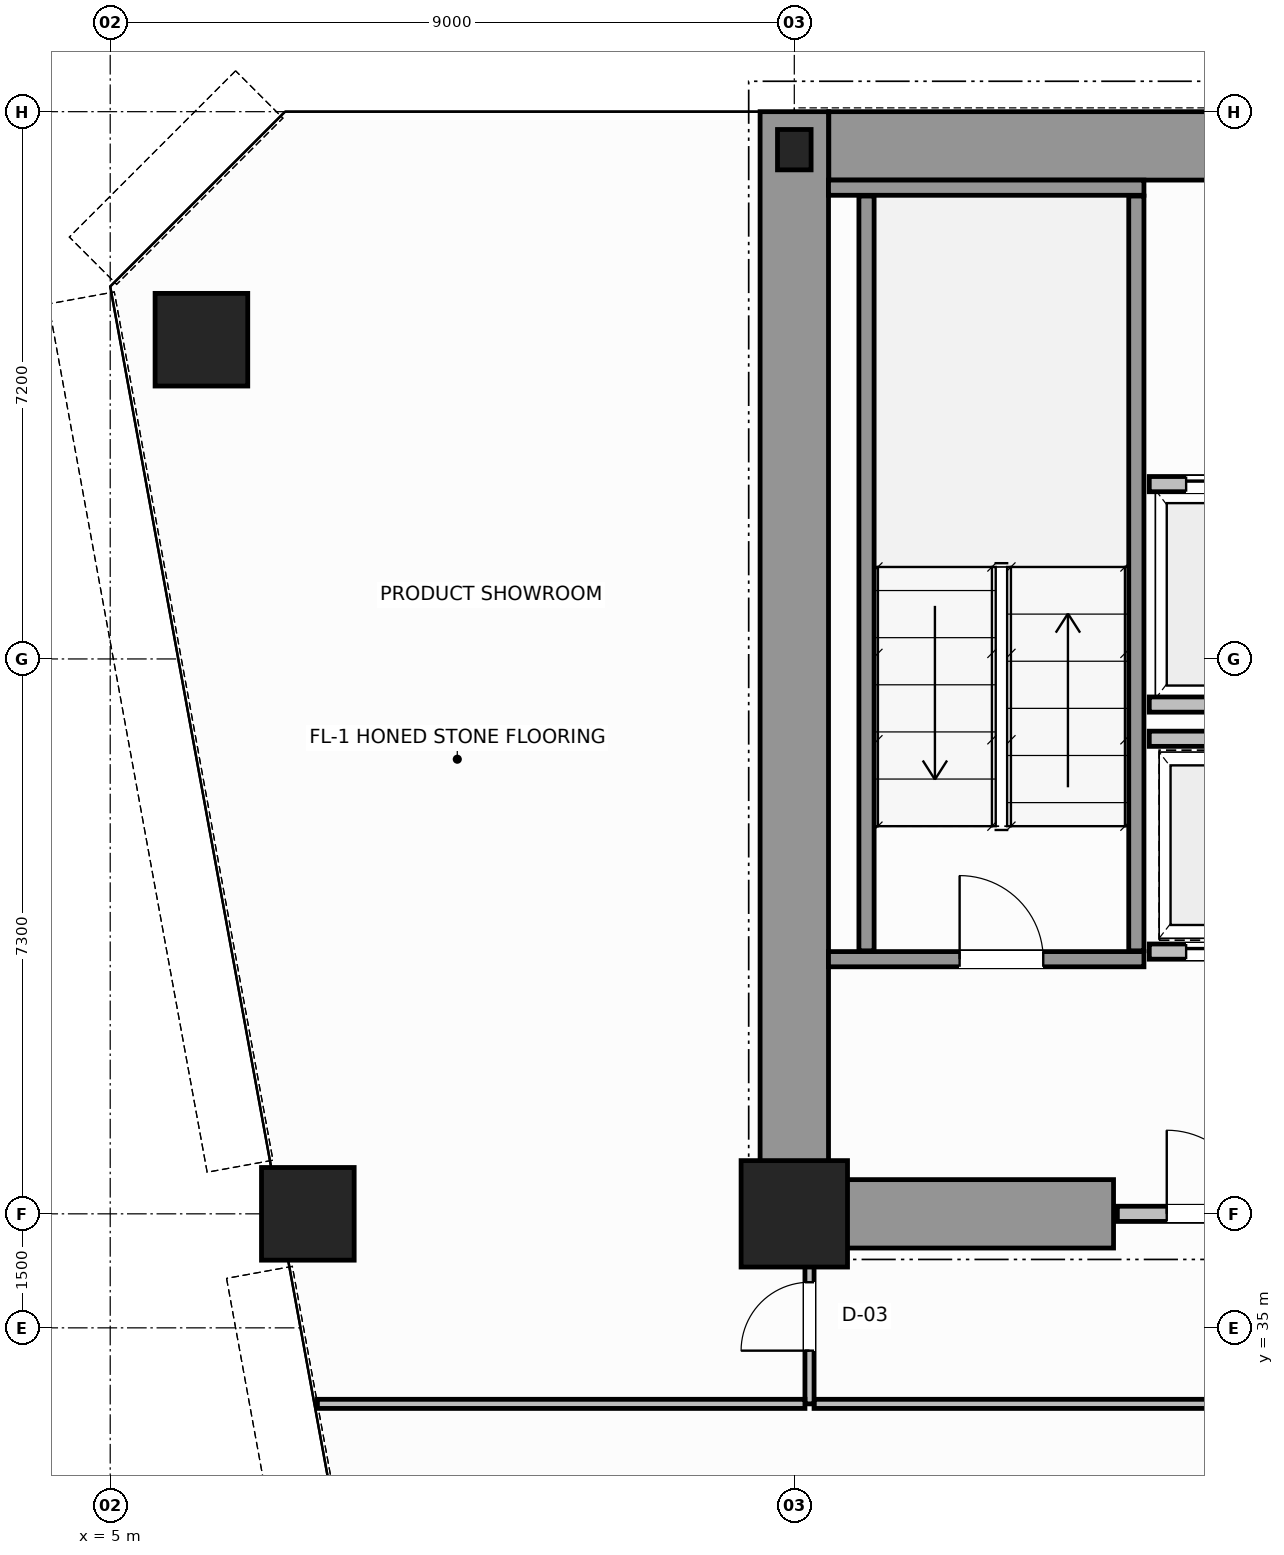
"""IFC4 building model, lengths in metres.
Left out: names, types, materials, properties, quantities, classifications, styles, units other than length and angle.
Written with IfcOpenShell. Run it as: python <this file> out.ifc"""

import sys

from ifc_helpers import new_model, si_unit, direction, frame, frame_2d, origin, origin_2d, place, context, subcontext, project, spatial, rectangle, hollow_circle, i_section, extrude, source, transform, mapped, element, fill, save


model = new_model("IFC4")
c1 = context("Model", 3, precision=1e-05, world=origin(), true_north=direction((0.0, 1.0)))
c2 = subcontext(c1, "Body", "Model", "MODEL_VIEW")
j1 = project(units=[si_unit("LENGTHUNIT", "METRE"), si_unit("PLANEANGLEUNIT", "RADIAN")], contexts=[c1])
p1 = place(None, origin())
s1 = spatial("IfcSite", under=j1, at=p1, CompositionType="ELEMENT")
p2 = place(p1, origin())
s2 = spatial("IfcBuilding", under=s1, at=p2, CompositionType="ELEMENT")
p3 = place(p2, frame((0.0, 0.0, 75.8)))
s3 = spatial("IfcBuildingStorey", under=s2, at=p3, CompositionType="ELEMENT", Elevation=75.8)
m1 = source(origin(), c2, "Body", "SweptSolid", [
    extrude(rectangle(XDim=1.4, YDim=1.4, at=origin_2d()), origin(), (0.0, 0.0, 1.0), 3.8),
])
p4 = place(p3, frame((14.0, 36.5, 0.0), z_axis=(0.0, 0.0, 1.0), x_axis=(1.0, 0.0, 0.0)))
e1 = element("IfcColumn", 1, at=p4, inside=s3, PredefinedType="COLUMN", context=c2, shape_type="MappedRepresentation", body=[
    mapped(m1, transform((0.0, 0.0, 0.0), scale=1.0)),
])
m2 = source(origin(), c2, "Body", "SweptSolid", [
    extrude(i_section(OverallWidth=0.442, OverallDepth=0.531, WebThickness=0.065, FlangeThickness=0.076, FilletRadius=0.015, at=origin_2d()), origin(), (0.0, 0.0, 1.0), 3.8),
])
p5 = place(p3, frame((14.0, 50.5, 0.0), z_axis=(0.0, 0.0, 1.0), x_axis=(1.0, 0.0, 0.0)))
e2 = element("IfcColumn", 2, at=p5, inside=s3, PredefinedType="COLUMN", context=c2, shape_type="MappedRepresentation", body=[
    mapped(m2, transform((0.0, 0.0, 0.0), scale=1.0)),
])
m3 = source(origin(), c2, "Body", "SweptSolid", [
    extrude(hollow_circle(Radius=0.61, WallThickness=0.05, at=origin_2d()), origin(), (0.0, 0.0, 1.0), 3.8),
])
for number, where, z_axis, x_axis in (
    (3, (6.2, 48.0, 0.0), (0.0, 0.0, 1.0), (1.0, 0.0, 0.0)),
    (4, (7.6, 36.5, 0.0), (0.0, 0.0, 1.0), (1.0, 0.0, 0.0)),
):
    element("IfcColumn", number, at=place(p3, frame(where, z_axis=z_axis, x_axis=x_axis)), inside=s3, PredefinedType="COLUMN", context=c2, shape_type="MappedRepresentation", body=[
        mapped(m3, transform((0.0, 0.0, 0.0), scale=1.0)),
    ])
p6 = place(p3, frame((14.454, 50.55, 0.0), z_axis=(0.0, 0.0, 1.0), x_axis=(1.0, 0.0, 0.0)))
e5 = element("IfcWall", 5, at=p6, inside=s3, PredefinedType="SHEAR", context=c2, shape_type="SweptSolid", body=[
    extrude(rectangle(XDim=19.544, YDim=0.9, at=frame_2d((9.772, 0.0))), origin(), (0.0, 0.0, 1.0), 3.8),
])
p7 = place(p3, frame((14.0, 36.5, 0.0), z_axis=(0.0, 0.0, 1.0), x_axis=(0.0, 1.0, 0.0)))
e6 = element("IfcWall", 6, at=p7, inside=s3, PredefinedType="SHEAR", context=c2, shape_type="SweptSolid", body=[
    extrude(rectangle(XDim=14.5, YDim=0.9, at=frame_2d((7.25, 0.0))), origin(), (0.0, 0.0, 1.0), 3.8),
])
p8 = place(p3, frame((14.47, 36.5, 0.0), z_axis=(0.0, 0.0, 1.0), x_axis=(1.0, 0.0, 0.0)))
e7 = element("IfcWall", 7, at=p8, inside=s3, PredefinedType="SHEAR", context=c2, shape_type="SweptSolid", body=[
    extrude(rectangle(XDim=3.73, YDim=0.9, at=frame_2d((1.865, 0.0))), origin(), (0.0, 0.0, 1.0), 2.38),
])
p9 = place(p3, frame((14.45, 39.85, 0.0), z_axis=(0.0, 0.0, 1.0), x_axis=(1.0, 0.0, 0.0)))
e8 = element("IfcWall", 8, at=p9, inside=s3, PredefinedType="SOLIDWALL", context=c2, shape_type="SweptSolid", body=[
    extrude(rectangle(XDim=4.15, YDim=0.2, at=frame_2d((2.075, 0.0))), origin(), (0.0, 0.0, 1.0), 3.8),
])
p10 = place(p9, frame((1.725, 0.0, 0.0)))
e9 = element("IfcOpeningElement", 9, at=p10, cuts=e8, PredefinedType="OPENING", context=c2, shape_type="SweptSolid", body=[
    extrude(rectangle(XDim=1.1, YDim=2.15, at=frame_2d((0.55, 1.075))), frame((0.0, 0.11, 0.0), z_axis=(0.0, -1.0, 0.0), x_axis=(1.0, 0.0, 0.0)), (0.0, 0.0, 1.0), 0.22),
])
p11 = place(p3, frame((14.45, 50.0, 0.0), z_axis=(0.0, 0.0, 1.0), x_axis=(1.0, 0.0, 0.0)))
e10 = element("IfcWall", 10, at=p11, inside=s3, PredefinedType="SOLIDWALL", context=c2, shape_type="SweptSolid", body=[
    extrude(rectangle(XDim=4.15, YDim=0.2, at=frame_2d((2.075, 0.0))), origin(), (0.0, 0.0, 1.0), 3.8),
])
for number, where, z_axis, x_axis in (
    (11, (14.95, 39.96, 0.0), (0.0, 0.0, 1.0), (0.0, 1.0, 0.0)),
    (12, (18.5, 39.96, 0.0), (0.0, 0.0, 1.0), (0.0, 1.0, 0.0)),
):
    element("IfcWall", number, at=place(p3, frame(where, z_axis=z_axis, x_axis=x_axis)), inside=s3, PredefinedType="SOLIDWALL", context=c2, shape_type="SweptSolid", body=[
        extrude(rectangle(XDim=9.93, YDim=0.2, at=frame_2d((4.965, 0.0))), origin(), (0.0, 0.0, 1.0), 3.8),
    ])
p12 = place(p3, frame((18.25, 36.5, 0.0), z_axis=(0.0, 0.0, 1.0), x_axis=(1.0, 0.0, 0.0)))
e13 = element("IfcWall", 13, at=p12, inside=s3, PredefinedType="SOLIDWALL", context=c2, shape_type="SweptSolid", body=[
    extrude(rectangle(XDim=2.47, YDim=0.2, at=frame_2d((1.235, 0.0))), origin(), (0.0, 0.0, 1.0), 2.37),
])
p13 = place(p12, frame((0.65, 0.0, 0.0)))
e14 = element("IfcOpeningElement", 14, at=p13, cuts=e13, PredefinedType="OPENING", context=c2, shape_type="SweptSolid", body=[
    extrude(rectangle(XDim=1.1, YDim=2.15, at=frame_2d((0.55, 1.075))), frame((0.0, 0.11, 0.0), z_axis=(0.0, -1.0, 0.0), x_axis=(1.0, 0.0, 0.0)), (0.0, 0.0, 1.0), 0.22),
])
p14 = place(p3, frame((18.67, 46.1, 0.0), z_axis=(0.0, 0.0, 1.0), x_axis=(1.0, 0.0, 0.0)))
e15 = element("IfcWall", 15, at=p14, inside=s3, PredefinedType="SOLIDWALL", context=c2, shape_type="SweptSolid", body=[
    extrude(rectangle(XDim=2.07, YDim=0.2, at=frame_2d((1.035, 0.0))), origin(), (0.0, 0.0, 1.0), 3.58),
])
p15 = place(p14, frame((0.485, 0.0, 0.0)))
e16 = element("IfcOpeningElement", 16, at=p15, cuts=e15, PredefinedType="OPENING", context=c2, shape_type="SweptSolid", body=[
    extrude(rectangle(XDim=1.1, YDim=2.15, at=frame_2d((0.55, 1.075))), frame((0.0, 0.11, 0.0), z_axis=(0.0, -1.0, 0.0), x_axis=(1.0, 0.0, 0.0)), (0.0, 0.0, 1.0), 0.22),
])
p16 = place(p3, frame((18.67, 43.2, 0.0), z_axis=(0.0, 0.0, 1.0), x_axis=(1.0, 0.0, 0.0)))
e17 = element("IfcWall", 17, at=p16, inside=s3, PredefinedType="SOLIDWALL", context=c2, shape_type="SweptSolid", body=[
    extrude(rectangle(XDim=2.07, YDim=0.2, at=frame_2d((1.035, 0.0))), origin(), (0.0, 0.0, 1.0), 3.58),
])
p17 = place(p3, frame((18.67, 39.95, 0.0), z_axis=(0.0, 0.0, 1.0), x_axis=(1.0, 0.0, 0.0)))
e18 = element("IfcWall", 18, at=p17, inside=s3, PredefinedType="SOLIDWALL", context=c2, shape_type="SweptSolid", body=[
    extrude(rectangle(XDim=2.07, YDim=0.2, at=frame_2d((1.035, 0.0))), origin(), (0.0, 0.0, 1.0), 3.58),
])
p18 = place(p17, frame((0.485, 0.0, 0.0)))
e19 = element("IfcOpeningElement", 19, at=p18, cuts=e18, PredefinedType="OPENING", context=c2, shape_type="SweptSolid", body=[
    extrude(rectangle(XDim=1.1, YDim=2.15, at=frame_2d((0.55, 1.075))), frame((0.0, 0.11, 0.0), z_axis=(0.0, -1.0, 0.0), x_axis=(1.0, 0.0, 0.0)), (0.0, 0.0, 1.0), 0.22),
])
p19 = place(p3, frame((18.67, 42.75, 0.0), z_axis=(0.0, 0.0, 1.0), x_axis=(1.0, 0.0, 0.0)))
e20 = element("IfcWall", 20, at=p19, inside=s3, PredefinedType="SOLIDWALL", context=c2, shape_type="SweptSolid", body=[
    extrude(rectangle(XDim=2.07, YDim=0.2, at=frame_2d((1.035, 0.0))), origin(), (0.0, 0.0, 1.0), 3.58),
])
p20 = place(p3, frame((14.26, 34.0, 0.0), z_axis=(0.0, 0.0, 1.0), x_axis=(1.0, 0.0, 0.0)))
e21 = element("IfcWall", 21, at=p20, inside=s3, PredefinedType="PARTITIONING", context=c2, shape_type="SweptSolid", body=[
    extrude(rectangle(XDim=15.88, YDim=0.12, at=frame_2d((7.94, 0.0))), origin(), (0.0, 0.0, 1.0), 3.58),
])
p21 = place(p3, frame((14.2, 34.0, 0.0), z_axis=(0.0, 0.0, 1.0), x_axis=(0.0, 1.0, 0.0)))
e22 = element("IfcWall", 22, at=p21, inside=s3, PredefinedType="PARTITIONING", context=c2, shape_type="SweptSolid", body=[
    extrude(rectangle(XDim=2.44, YDim=0.12, at=frame_2d((1.22, 0.0))), origin(), (0.0, 0.0, 1.0), 3.58),
])
p22 = place(p21, frame((0.7, 0.0, 0.0)))
e23 = element("IfcOpeningElement", 23, at=p22, cuts=e22, PredefinedType="OPENING", context=c2, shape_type="SweptSolid", body=[
    extrude(rectangle(XDim=0.9, YDim=2.15, at=frame_2d((0.45, 1.075))), frame((0.0, 0.07, 0.0), z_axis=(0.0, -1.0, 0.0), x_axis=(1.0, 0.0, 0.0)), (0.0, 0.0, 1.0), 0.14),
])
p23 = place(p3, frame((7.726, 34.0, 0.0), z_axis=(0.0, 0.0, 1.0), x_axis=(1.0, 0.0, 0.0)))
e24 = element("IfcWall", 24, at=p23, inside=s3, PredefinedType="PARTITIONING", context=c2, shape_type="SweptSolid", body=[
    extrude(rectangle(XDim=6.414, YDim=0.12, at=frame_2d((3.207, 0.0))), origin(), (0.0, 0.0, 1.0), 3.58),
])
m4 = source(origin(), c2, "Body", "SweptSolid", [
    extrude(rectangle(XDim=1.1, YDim=2.15, at=frame_2d((0.55, 1.075))), frame((0.0, 0.025, 0.0), z_axis=(0.0, -1.0, 0.0), x_axis=(1.0, 0.0, 0.0)), (0.0, 0.0, 1.0), 0.05),
])
p24 = place(p10, origin())
e25 = element("IfcDoor", 25, at=p24, inside=s3, OperationType="SINGLE_SWING_LEFT", PredefinedType="DOOR", context=c2, shape_type="MappedRepresentation", body=[
    mapped(m4, transform((0.0, 0.0, 0.0), scale=1.0)),
])
fill(e9, e25)
p25 = place(p13, origin())
e26 = element("IfcDoor", 26, at=p25, inside=s3, OperationType="SINGLE_SWING_RIGHT", PredefinedType="DOOR", context=c2, shape_type="MappedRepresentation", body=[
    mapped(m4, transform((0.0, 0.0, 0.0), scale=1.0)),
])
fill(e14, e26)
p26 = place(p15, origin())
e27 = element("IfcDoor", 27, at=p26, inside=s3, OperationType="DOUBLE_DOOR_SLIDING", PredefinedType="DOOR", context=c2, shape_type="MappedRepresentation", body=[
    mapped(m4, transform((0.0, 0.0, 0.0), scale=1.0)),
])
fill(e16, e27)
p27 = place(p18, origin())
e28 = element("IfcDoor", 28, at=p27, inside=s3, OperationType="DOUBLE_DOOR_SLIDING", PredefinedType="DOOR", context=c2, shape_type="MappedRepresentation", body=[
    mapped(m4, transform((0.0, 0.0, 0.0), scale=1.0)),
])
fill(e19, e28)
m5 = source(origin(), c2, "Body", "SweptSolid", [
    extrude(rectangle(XDim=0.9, YDim=2.15, at=frame_2d((0.45, 1.075))), frame((0.0, 0.025, 0.0), z_axis=(0.0, -1.0, 0.0), x_axis=(1.0, 0.0, 0.0)), (0.0, 0.0, 1.0), 0.05),
])
p28 = place(p22, origin())
e29 = element("IfcDoor", 29, at=p28, inside=s3, OperationType="SINGLE_SWING_LEFT", PredefinedType="DOOR", context=c2, shape_type="MappedRepresentation", body=[
    mapped(m5, transform((0.0, 0.0, 0.0), scale=1.0)),
])
fill(e23, e29)
save(model, sys.argv[1])
